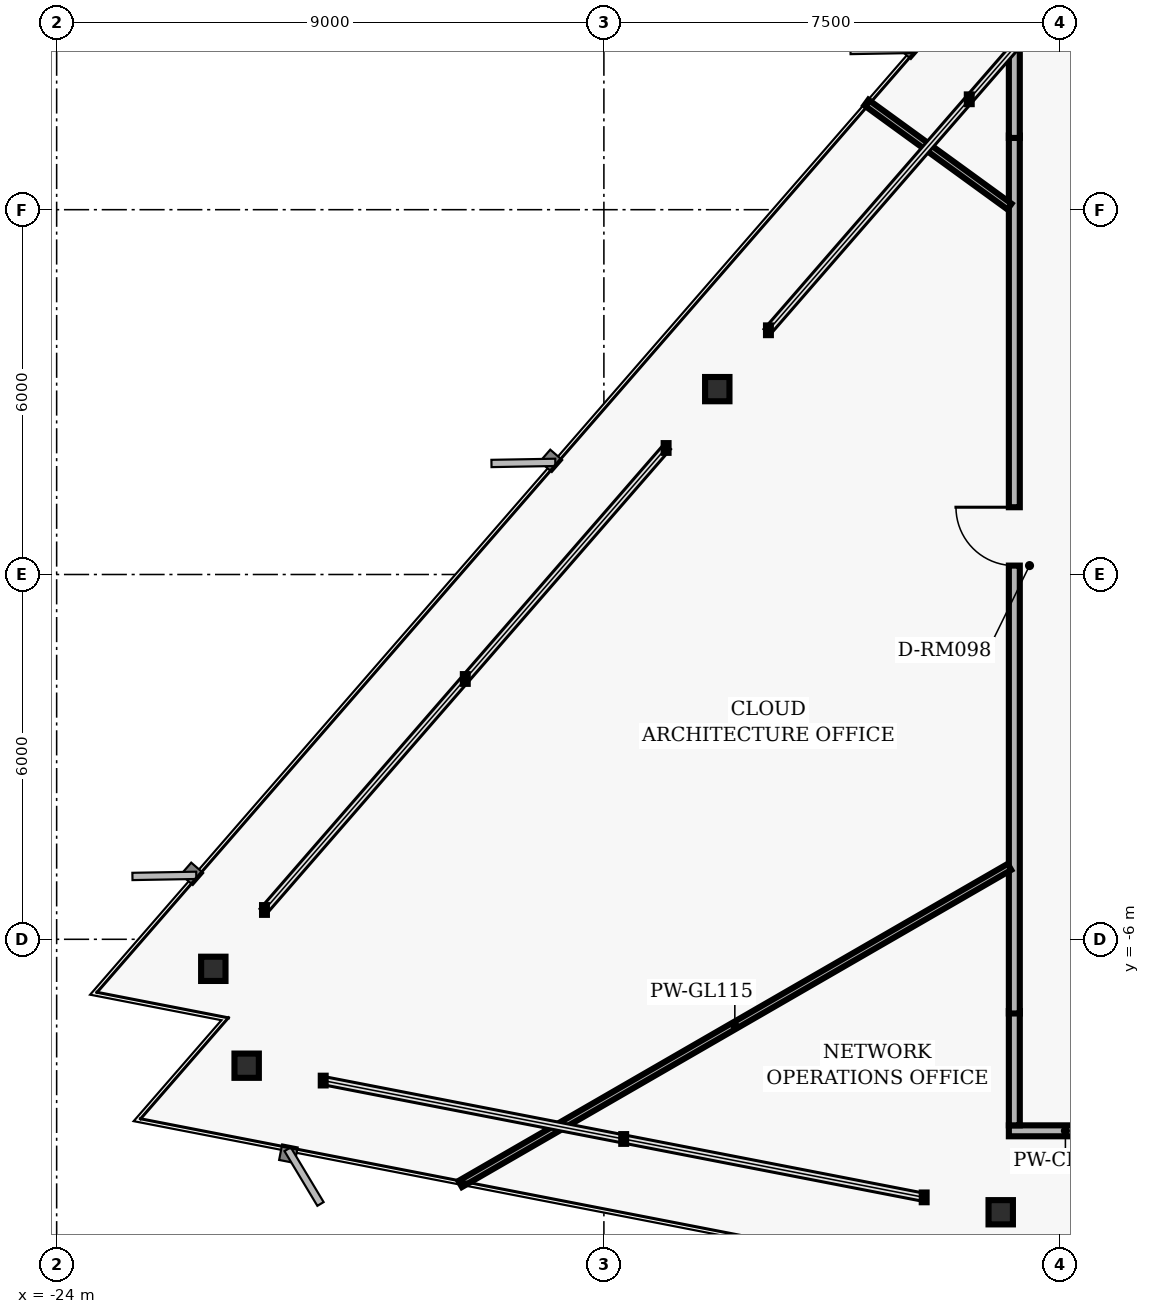
"""IFC4 building model, lengths in metres.
Left out: names, types, materials, properties, quantities, classifications, styles, units other than length and angle.
Written with IfcOpenShell. Run it as: python <this file> out.ifc"""

import sys

from ifc_helpers import new_model, si_unit, direction, frame, frame_2d, origin, origin_2d, place, context, subcontext, project, spatial, rectangle, i_section, extrude, element, fill, save


model = new_model("IFC4")
c1 = context("Model", 3, precision=1e-05, world=origin(), true_north=direction((0.0, 1.0)))
c2 = subcontext(c1, "Body", "Model", "MODEL_VIEW")
j1 = project(units=[si_unit("LENGTHUNIT", "METRE"), si_unit("PLANEANGLEUNIT", "RADIAN")], contexts=[c1])
p1 = place(None, origin())
s1 = spatial("IfcSite", under=j1, at=p1, CompositionType="ELEMENT")
p2 = place(p1, origin())
s2 = spatial("IfcBuilding", under=s1, at=p2, CompositionType="ELEMENT")
p3 = place(p2, frame((0.0, 0.0, 147.2)))
s3 = spatial("IfcBuildingStorey", under=s2, at=p3, CompositionType="ELEMENT", Elevation=147.2)
for number, where, z_axis, x_axis in (
    (1, (-13.135, 3.049, 0.0), (0.0, 0.0, 1.0), (1.0, 0.0, 0.0)),
    (2, (-21.424, -6.486, 0.0), (0.0, 0.0, 1.0), (1.0, 0.0, 0.0)),
    (3, (-20.875, -8.079, 0.0), (0.0, 0.0, 1.0), (1.0, 0.0, 0.0)),
    (4, (-8.474, -10.49, 0.0), (0.0, 0.0, 1.0), (1.0, 0.0, 0.0)),
):
    element("IfcColumn", number, at=place(p3, frame(where, z_axis=z_axis, x_axis=x_axis)), inside=s3, PredefinedType="COLUMN", context=c2, shape_type="SweptSolid", body=[
        extrude(i_section(OverallWidth=0.401, OverallDepth=0.399, WebThickness=0.025, FlangeThickness=0.04, FilletRadius=0.018, at=origin_2d()), origin(), (0.0, 0.0, 1.0), 3.04),
    ])
p4 = place(p3, frame((-6.48, -9.15, 0.0), z_axis=(0.0, 0.0, 1.0), x_axis=(-1.0, 0.0, 0.0)))
e5 = element("IfcWall", 5, at=p4, inside=s3, PredefinedType="PARTITIONING", context=c2, shape_type="SweptSolid", body=[
    extrude(rectangle(XDim=1.86, YDim=0.18, at=frame_2d((0.93, 0.0))), origin(), (0.0, 0.0, 1.0), 2.33),
])
p5 = place(p3, frame((-8.25, -9.06, 0.0), z_axis=(0.0, 0.0, 1.0), x_axis=(0.0, 1.0, 0.0)))
e6 = element("IfcWall", 6, at=p5, inside=s3, PredefinedType="PARTITIONING", context=c2, shape_type="SweptSolid", body=[
    extrude(rectangle(XDim=1.88, YDim=0.18, at=frame_2d((0.94, 0.0))), origin(), (0.0, 0.0, 1.0), 2.763),
])
p6 = place(p3, frame((-8.25, -7.22, 0.0), z_axis=(0.0, 0.0, 1.0), x_axis=(0.0, 1.0, 0.0)))
e7 = element("IfcWall", 7, at=p6, inside=s3, PredefinedType="PARTITIONING", context=c2, shape_type="SweptSolid", body=[
    extrude(rectangle(XDim=14.44, YDim=0.18, at=frame_2d((7.22, 0.0))), origin(), (0.0, 0.0, 1.0), 2.763),
])
p7 = place(p6, frame((7.366, 0.0, 0.0)))
e8 = element("IfcOpeningElement", 8, at=p7, cuts=e7, PredefinedType="OPENING", context=c2, shape_type="SweptSolid", body=[
    extrude(rectangle(XDim=0.96, YDim=2.02, at=frame_2d((0.48, 1.01))), frame((0.0, 0.1, 0.0), z_axis=(0.0, -1.0, 0.0), x_axis=(1.0, 0.0, 0.0)), (0.0, 0.0, 1.0), 0.2),
])
p8 = place(p3, frame((-8.25, 7.18, 0.0), z_axis=(0.0, 0.0, 1.0), x_axis=(0.0, 1.0, 0.0)))
e9 = element("IfcWall", 9, at=p8, inside=s3, PredefinedType="PARTITIONING", context=c2, shape_type="SweptSolid", body=[
    extrude(rectangle(XDim=1.88, YDim=0.18, at=frame_2d((0.94, 0.0))), origin(), (0.0, 0.0, 1.0), 2.763),
])
p9 = place(p3, frame((-8.33, -4.809, 0.0), z_axis=(0.0, 0.0, 1.0), x_axis=(-0.866024997974, -0.500000702884, 0.0)))
e10 = element("IfcWall", 10, at=p9, inside=s3, PredefinedType="MOVABLE", context=c2, shape_type="SweptSolid", body=[
    extrude(rectangle(XDim=10.431, YDim=0.115, at=frame_2d((5.215, 0.0))), origin(), (0.0, 0.0, 1.0), 2.132),
])
p10 = place(p3, frame((-8.33, 6.052, 0.0), z_axis=(0.0, 0.0, 1.0), x_axis=(-0.808997455981, 0.587812143644, 0.0)))
e11 = element("IfcWall", 11, at=p10, inside=s3, PredefinedType="MOVABLE", context=c2, shape_type="SweptSolid", body=[
    extrude(rectangle(XDim=2.907, YDim=0.115, at=frame_2d((1.454, 0.0))), origin(), (0.0, 0.0, 1.0), 2.763),
])
p11 = place(p7, origin())
e12 = element("IfcDoor", 12, at=p11, inside=s3, OperationType="SINGLE_SWING_RIGHT", PredefinedType="DOOR", context=c2, shape_type="SweptSolid", body=[
    extrude(rectangle(XDim=0.96, YDim=2.02, at=frame_2d((0.48, 1.01))), frame((0.0, 0.025, 0.0), z_axis=(0.0, -1.0, 0.0), x_axis=(1.0, 0.0, 0.0)), (0.0, 0.0, 1.0), 0.05),
])
fill(e8, e12)
save(model, sys.argv[1])
